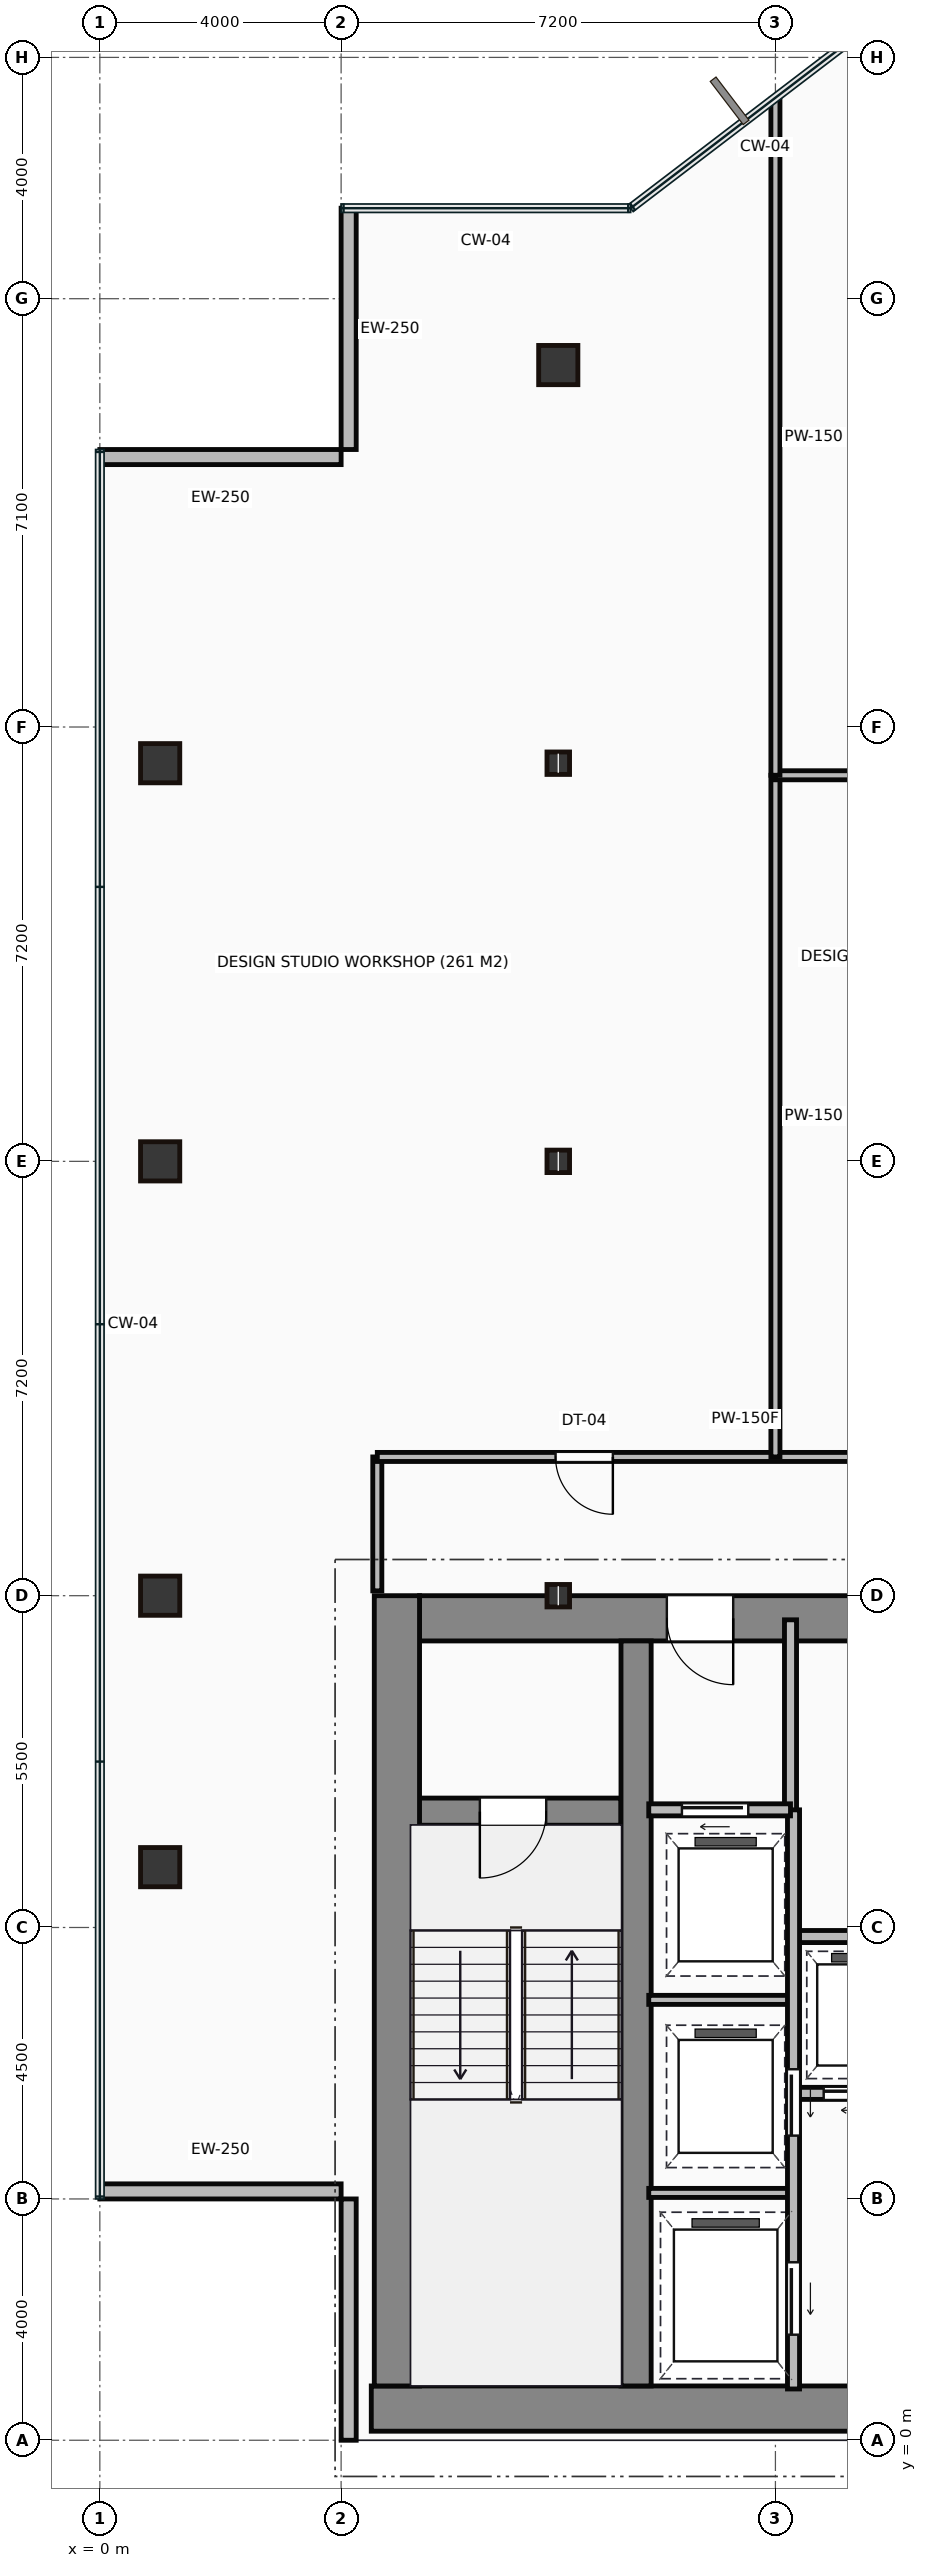
"""IFC4 building model, lengths in metres.
Left out: names, types, materials, properties, quantities, classifications, styles, units other than length and angle.
Written with IfcOpenShell. Run it as: python <this file> out.ifc"""

import sys

from ifc_helpers import new_model, si_unit, direction, frame, frame_2d, origin, origin_2d, place, context, subcontext, project, spatial, rectangle, hollow_rectangle, i_section, extrude, source, transform, mapped, element, fill, save


model = new_model("IFC4")
c1 = context("Model", 3, precision=1e-05, world=origin(), true_north=direction((0.0, 1.0)))
c2 = subcontext(c1, "Body", "Model", "MODEL_VIEW")
j1 = project(units=[si_unit("LENGTHUNIT", "METRE"), si_unit("PLANEANGLEUNIT", "RADIAN")], contexts=[c1])
p1 = place(None, origin())
s1 = spatial("IfcSite", under=j1, at=p1, CompositionType="ELEMENT")
p2 = place(p1, origin())
s2 = spatial("IfcBuilding", under=s1, at=p2, CompositionType="ELEMENT")
p3 = place(p2, frame((0.0, 0.0, 173.45)))
s3 = spatial("IfcBuildingStorey", under=s2, at=p3, CompositionType="ELEMENT", Elevation=173.45)
m1 = source(origin(), c2, "Body", "SweptSolid", [
    extrude(rectangle(XDim=29.5, YDim=0.75, at=frame_2d((14.75, 0.0))), origin(), (0.0, 0.0, 1.0), 3.65),
])
p4 = place(p3, frame((4.5, 0.525, 0.0), z_axis=(0.0, 0.0, 1.0), x_axis=(1.0, 0.0, 0.0)))
e1 = element("IfcWall", 1, at=p4, inside=s3, PredefinedType="SHEAR", context=c2, shape_type="MappedRepresentation", body=[
    mapped(m1, transform((0.0, 0.0, 0.0))),
])
m2 = source(origin(), c2, "Body", "SweptSolid", [
    extrude(rectangle(XDim=13.1, YDim=0.75, at=frame_2d((6.55, 0.0))), origin(), (0.0, 0.0, 1.0), 3.65),
])
p5 = place(p3, frame((4.925, 0.9, 0.0), z_axis=(0.0, 0.0, 1.0), x_axis=(0.0, 1.0, 0.0)))
e2 = element("IfcWall", 2, at=p5, inside=s3, PredefinedType="SHEAR", context=c2, shape_type="MappedRepresentation", body=[
    mapped(m2, transform((0.0, 0.0, 0.0))),
])
m3 = source(origin(), c2, "Body", "SweptSolid", [
    extrude(rectangle(XDim=9.1, YDim=0.75, at=frame_2d((4.55, 0.0))), origin(), (0.0, 0.0, 1.0), 3.65),
])
p6 = place(p3, frame((5.3, 13.625, 0.0), z_axis=(0.0, 0.0, 1.0), x_axis=(1.0, 0.0, 0.0)))
e3 = element("IfcWall", 3, at=p6, inside=s3, PredefinedType="SHEAR", context=c2, shape_type="MappedRepresentation", body=[
    mapped(m3, transform((0.0, 0.0, 0.0))),
])
p7 = place(p6, frame((4.1, 0.0, 0.0)))
e4 = element("IfcOpeningElement", 4, at=p7, cuts=e3, PredefinedType="OPENING", context=c2, shape_type="SweptSolid", body=[
    extrude(rectangle(XDim=1.1, YDim=2.15, at=frame_2d((0.55, 1.075))), frame((0.0, 0.385, 0.0), z_axis=(0.0, -1.0, 0.0), x_axis=(1.0, 0.0, 0.0)), (0.0, 0.0, 1.0), 0.77),
])
m4 = source(origin(), c2, "Body", "SweptSolid", [
    extrude(rectangle(XDim=12.35, YDim=0.5, at=frame_2d((6.175, 0.0))), origin(), (0.0, 0.0, 1.0), 3.65),
])
p8 = place(p3, frame((8.89, 0.9, 0.0), z_axis=(0.0, 0.0, 1.0), x_axis=(0.0, 1.0, 0.0)))
e5 = element("IfcWall", 5, at=p8, inside=s3, PredefinedType="SHEAR", context=c2, shape_type="MappedRepresentation", body=[
    mapped(m4, transform((0.0, 0.0, 0.0))),
])
m5 = source(origin(), c2, "Body", "SweptSolid", [
    extrude(rectangle(XDim=3.39, YDim=0.45, at=frame_2d((1.695, 0.0))), origin(), (0.0, 0.0, 1.0), 3.65),
])
p9 = place(p3, frame((5.25, 10.42, 0.0), z_axis=(0.0, 0.0, 1.0), x_axis=(1.0, 0.0, 0.0)))
e6 = element("IfcWall", 6, at=p9, inside=s3, PredefinedType="SHEAR", context=c2, shape_type="MappedRepresentation", body=[
    mapped(m5, transform((0.0, 0.0, 0.0))),
])
p10 = place(p9, frame((1.05, 0.0, 0.0)))
e7 = element("IfcOpeningElement", 7, at=p10, cuts=e6, PredefinedType="OPENING", context=c2, shape_type="SweptSolid", body=[
    extrude(rectangle(XDim=1.1, YDim=2.15, at=frame_2d((0.55, 1.075))), frame((0.0, 0.235, 0.0), z_axis=(0.0, -1.0, 0.0), x_axis=(1.0, 0.0, 0.0)), (0.0, 0.0, 1.0), 0.47),
])
m6 = source(origin(), c2, "Body", "SweptSolid", [
    extrude(hollow_rectangle(XDim=0.65, YDim=0.65, WallThickness=0.032, at=origin_2d()), origin(), (0.0, 0.0, 1.0), 3.65),
])
for number, where, z_axis, x_axis in (
    (8, (1.0, 9.5, 0.0), (0.0, 0.0, 1.0), (1.0, 0.0, 0.0)),
    (9, (1.0, 14.0, 0.0), (0.0, 0.0, 1.0), (1.0, 0.0, 0.0)),
    (10, (1.0, 21.2, 0.0), (0.0, 0.0, 1.0), (1.0, 0.0, 0.0)),
    (11, (1.0, 27.8, 0.0), (0.0, 0.0, 1.0), (1.0, 0.0, 0.0)),
):
    element("IfcColumn", number, at=place(p3, frame(where, z_axis=z_axis, x_axis=x_axis)), inside=s3, PredefinedType="COLUMN", context=c2, shape_type="MappedRepresentation", body=[
        mapped(m6, transform((0.0, 0.0, 0.0))),
    ])
m7 = source(origin(), c2, "Body", "SweptSolid", [
    extrude(i_section(OverallWidth=0.374, OverallDepth=0.372, WebThickness=0.016, FlangeThickness=0.026, at=origin_2d()), origin(), (0.0, 0.0, 1.0), 3.65),
])
for number, where, z_axis, x_axis in (
    (12, (7.6, 14.0, 0.0), (0.0, 0.0, 1.0), (1.0, 0.0, 0.0)),
    (13, (7.6, 21.2, 0.0), (0.0, 0.0, 1.0), (1.0, 0.0, 0.0)),
    (14, (7.6, 27.8, 0.0), (0.0, 0.0, 1.0), (1.0, 0.0, 0.0)),
):
    element("IfcColumn", number, at=place(p3, frame(where, z_axis=z_axis, x_axis=x_axis)), inside=s3, PredefinedType="COLUMN", context=c2, shape_type="MappedRepresentation", body=[
        mapped(m7, transform((0.0, 0.0, 0.0))),
    ])
p11 = place(p3, frame((7.6, 34.4, 0.0), z_axis=(0.0, 0.0, 1.0), x_axis=(1.0, 0.0, 0.0)))
e15 = element("IfcColumn", 15, at=p11, inside=s3, PredefinedType="COLUMN", context=c2, shape_type="MappedRepresentation", body=[
    mapped(m6, transform((0.0, 0.0, 0.0))),
])
m8 = source(origin(), c2, "Body", "SweptSolid", [
    extrude(rectangle(XDim=4.0, YDim=0.25, at=frame_2d((2.0, 0.0))), origin(), (0.0, 0.0, 1.0), 3.4),
])
for number, where, z_axis, x_axis in (
    (16, (4.125, 37.0, 0.0), (0.0, 0.0, 1.0), (0.0, -1.0, 0.0)),
    (17, (4.0, 32.875, 0.0), (0.0, 0.0, 1.0), (-1.0, 0.0, 0.0)),
    (18, (0.0, 4.125, 0.0), (0.0, 0.0, 1.0), (1.0, 0.0, 0.0)),
    (19, (4.125, 4.0, 0.0), (0.0, 0.0, 1.0), (0.0, -1.0, 0.0)),
):
    element("IfcWall", number, at=place(p3, frame(where, z_axis=z_axis, x_axis=x_axis)), inside=s3, PredefinedType="STANDARD", context=c2, shape_type="MappedRepresentation", body=[
        mapped(m8, transform((0.0, 0.0, 0.0))),
    ])
m9 = source(origin(), c2, "Body", "SweptSolid", [
    extrude(rectangle(XDim=3.18, YDim=0.2, at=frame_2d((1.59, 0.0))), origin(), (0.0, 0.0, 1.0), 3.4),
])
p12 = place(p3, frame((11.45, 10.42, 0.0), z_axis=(0.0, 0.0, 1.0), x_axis=(0.0, 1.0, 0.0)))
e20 = element("IfcWall", 20, at=p12, inside=s3, PredefinedType="PARTITIONING", context=c2, shape_type="MappedRepresentation", body=[
    mapped(m9, transform((0.0, 0.0, 0.0))),
])
m10 = source(origin(), c2, "Body", "SweptSolid", [
    extrude(rectangle(XDim=2.35, YDim=0.2, at=frame_2d((1.175, 0.0))), origin(), (0.0, 0.0, 1.0), 3.4),
])
p13 = place(p3, frame((9.1, 10.45, 0.0), z_axis=(0.0, 0.0, 1.0), x_axis=(1.0, 0.0, 0.0)))
e21 = element("IfcWall", 21, at=p13, inside=s3, PredefinedType="PARTITIONING", context=c2, shape_type="MappedRepresentation", body=[
    mapped(m10, transform((0.0, 0.0, 0.0))),
])
p14 = place(p13, frame((0.55, 0.0, 0.0)))
e22 = element("IfcOpeningElement", 22, at=p14, cuts=e21, PredefinedType="OPENING", context=c2, shape_type="SweptSolid", body=[
    extrude(rectangle(XDim=1.1, YDim=2.15, at=frame_2d((0.55, 1.075))), frame((0.0, 0.11, 0.0), z_axis=(0.0, -1.0, 0.0), x_axis=(1.0, 0.0, 0.0)), (0.0, 0.0, 1.0), 0.22),
])
m11 = source(origin(), c2, "Body", "SweptSolid", [
    extrude(rectangle(XDim=9.6, YDim=0.2, at=frame_2d((4.8, 0.0))), origin(), (0.0, 0.0, 1.0), 3.4),
])
p15 = place(p3, frame((11.5, 0.85, 0.0), z_axis=(0.0, 0.0, 1.0), x_axis=(0.0, 1.0, 0.0)))
e23 = element("IfcWall", 23, at=p15, inside=s3, PredefinedType="PARTITIONING", context=c2, shape_type="MappedRepresentation", body=[
    mapped(m11, transform((0.0, 0.0, 0.0))),
])
p16 = place(p15, frame((4.2, 0.0, 0.0)))
e24 = element("IfcOpeningElement", 24, at=p16, cuts=e23, PredefinedType="OPENING", context=c2, shape_type="SweptSolid", body=[
    extrude(rectangle(XDim=1.1, YDim=2.15, at=frame_2d((0.55, 1.075))), frame((0.0, 0.11, 0.0), z_axis=(0.0, -1.0, 0.0), x_axis=(1.0, 0.0, 0.0)), (0.0, 0.0, 1.0), 0.22),
])
p17 = place(p15, frame((0.9, 0.0, 0.0)))
e25 = element("IfcOpeningElement", 25, at=p17, cuts=e23, PredefinedType="OPENING", context=c2, shape_type="SweptSolid", body=[
    extrude(rectangle(XDim=1.2, YDim=2.15, at=frame_2d((0.6, 1.075))), frame((0.0, 0.11, 0.0), z_axis=(0.0, -1.0, 0.0), x_axis=(1.0, 0.0, 0.0)), (0.0, 0.0, 1.0), 0.22),
])
m12 = source(origin(), c2, "Body", "SweptSolid", [
    extrude(rectangle(XDim=2.4, YDim=0.15, at=frame_2d((1.2, 0.0))), origin(), (0.0, 0.0, 1.0), 3.4),
])
for number, where, z_axis, x_axis in (
    (26, (9.1, 4.1, 0.0), (0.0, 0.0, 1.0), (1.0, 0.0, 0.0)),
    (27, (9.1, 7.3, 0.0), (0.0, 0.0, 1.0), (1.0, 0.0, 0.0)),
):
    element("IfcWall", number, at=place(p3, frame(where, z_axis=z_axis, x_axis=x_axis)), inside=s3, PredefinedType="PARTITIONING", context=c2, shape_type="MappedRepresentation", body=[
        mapped(m12, transform((0.0, 0.0, 0.0))),
    ])
m13 = source(origin(), c2, "Body", "SweptSolid", [
    extrude(rectangle(XDim=11.85, YDim=0.2, at=frame_2d((5.925, 0.0))), origin(), (0.0, 0.0, 1.0), 3.4),
])
p18 = place(p3, frame((11.55, 5.75, 0.0), z_axis=(0.0, 0.0, 1.0), x_axis=(1.0, 0.0, 0.0)))
e28 = element("IfcWall", 28, at=p18, inside=s3, PredefinedType="PARTITIONING", context=c2, shape_type="MappedRepresentation", body=[
    mapped(m13, transform((0.0, 0.0, 0.0))),
])
p19 = place(p18, frame((0.45, 0.0, 0.0)))
e29 = element("IfcOpeningElement", 29, at=p19, cuts=e28, PredefinedType="OPENING", context=c2, shape_type="SweptSolid", body=[
    extrude(rectangle(XDim=1.05, YDim=2.15, at=frame_2d((0.525, 1.075))), frame((0.0, 0.11, 0.0), z_axis=(0.0, -1.0, 0.0), x_axis=(1.0, 0.0, 0.0)), (0.0, 0.0, 1.0), 0.22),
])
p20 = place(p18, frame((2.4, 0.0, 0.0)))
e30 = element("IfcOpeningElement", 30, at=p20, cuts=e28, PredefinedType="OPENING", context=c2, shape_type="SweptSolid", body=[
    extrude(rectangle(XDim=1.05, YDim=2.15, at=frame_2d((0.525, 1.075))), frame((0.0, 0.11, 0.0), z_axis=(0.0, -1.0, 0.0), x_axis=(1.0, 0.0, 0.0)), (0.0, 0.0, 1.0), 0.22),
])
p21 = place(p18, frame((4.35, 0.0, 0.0)))
e31 = element("IfcOpeningElement", 31, at=p21, cuts=e28, PredefinedType="OPENING", context=c2, shape_type="SweptSolid", body=[
    extrude(rectangle(XDim=1.05, YDim=2.15, at=frame_2d((0.525, 1.075))), frame((0.0, 0.11, 0.0), z_axis=(0.0, -1.0, 0.0), x_axis=(1.0, 0.0, 0.0)), (0.0, 0.0, 1.0), 0.22),
])
p22 = place(p18, frame((6.3, 0.0, 0.0)))
e32 = element("IfcOpeningElement", 32, at=p22, cuts=e28, PredefinedType="OPENING", context=c2, shape_type="SweptSolid", body=[
    extrude(rectangle(XDim=1.05, YDim=2.15, at=frame_2d((0.525, 1.075))), frame((0.0, 0.11, 0.0), z_axis=(0.0, -1.0, 0.0), x_axis=(1.0, 0.0, 0.0)), (0.0, 0.0, 1.0), 0.22),
])
p23 = place(p18, frame((8.25, 0.0, 0.0)))
e33 = element("IfcOpeningElement", 33, at=p23, cuts=e28, PredefinedType="OPENING", context=c2, shape_type="SweptSolid", body=[
    extrude(rectangle(XDim=1.05, YDim=2.15, at=frame_2d((0.525, 1.075))), frame((0.0, 0.11, 0.0), z_axis=(0.0, -1.0, 0.0), x_axis=(1.0, 0.0, 0.0)), (0.0, 0.0, 1.0), 0.22),
])
p24 = place(p18, frame((10.2, 0.0, 0.0)))
e34 = element("IfcOpeningElement", 34, at=p24, cuts=e28, PredefinedType="OPENING", context=c2, shape_type="SweptSolid", body=[
    extrude(rectangle(XDim=1.05, YDim=2.15, at=frame_2d((0.525, 1.075))), frame((0.0, 0.11, 0.0), z_axis=(0.0, -1.0, 0.0), x_axis=(1.0, 0.0, 0.0)), (0.0, 0.0, 1.0), 0.22),
])
p25 = place(p3, frame((11.55, 8.35, 0.0), z_axis=(0.0, 0.0, 1.0), x_axis=(1.0, 0.0, 0.0)))
e35 = element("IfcWall", 35, at=p25, inside=s3, PredefinedType="PARTITIONING", context=c2, shape_type="MappedRepresentation", body=[
    mapped(m13, transform((0.0, 0.0, 0.0))),
])
m14 = source(origin(), c2, "Body", "SweptSolid", [
    extrude(rectangle(XDim=2.22, YDim=0.15, at=frame_2d((1.11, 0.0))), origin(), (0.0, 0.0, 1.0), 3.4),
])
p26 = place(p3, frame((4.6, 14.08, 0.0), z_axis=(0.0, 0.0, 1.0), x_axis=(0.0, 1.0, 0.0)))
e36 = element("IfcWall", 36, at=p26, inside=s3, PredefinedType="PARTITIONING", context=c2, shape_type="MappedRepresentation", body=[
    mapped(m14, transform((0.0, 0.0, 0.0))),
])
m15 = source(origin(), c2, "Body", "SweptSolid", [
    extrude(rectangle(XDim=12.2, YDim=0.15, at=frame_2d((6.1, 0.0))), origin(), (0.0, 0.0, 1.0), 3.4),
])
p27 = place(p3, frame((4.6, 16.3, 0.0), z_axis=(0.0, 0.0, 1.0), x_axis=(1.0, 0.0, 0.0)))
e37 = element("IfcWall", 37, at=p27, inside=s3, PredefinedType="PARTITIONING", context=c2, shape_type="MappedRepresentation", body=[
    mapped(m15, transform((0.0, 0.0, 0.0))),
])
p28 = place(p27, frame((2.955, 0.0, 0.0)))
e38 = element("IfcOpeningElement", 38, at=p28, cuts=e37, PredefinedType="OPENING", context=c2, shape_type="SweptSolid", body=[
    extrude(rectangle(XDim=0.95, YDim=2.15, at=frame_2d((0.475, 1.075))), frame((0.0, 0.085, 0.0), z_axis=(0.0, -1.0, 0.0), x_axis=(1.0, 0.0, 0.0)), (0.0, 0.0, 1.0), 0.17),
])
m16 = source(origin(), c2, "Body", "SweptSolid", [
    extrude(rectangle(XDim=11.3, YDim=0.15, at=frame_2d((5.65, 0.0))), origin(), (0.0, 0.0, 1.0), 3.4),
])
p29 = place(p3, frame((11.2, 27.6, 0.0), z_axis=(0.0, 0.0, 1.0), x_axis=(0.0, -1.0, 0.0)))
e39 = element("IfcWall", 39, at=p29, inside=s3, PredefinedType="PARTITIONING", context=c2, shape_type="MappedRepresentation", body=[
    mapped(m16, transform((0.0, 0.0, 0.0))),
])
m17 = source(origin(), c2, "Body", "SweptSolid", [
    extrude(rectangle(XDim=5.6, YDim=0.15, at=frame_2d((2.8, 0.0))), origin(), (0.0, 0.0, 1.0), 3.4),
])
p30 = place(p3, frame((11.2, 27.6, 0.0), z_axis=(0.0, 0.0, 1.0), x_axis=(1.0, 0.0, 0.0)))
e40 = element("IfcWall", 40, at=p30, inside=s3, PredefinedType="PARTITIONING", context=c2, shape_type="MappedRepresentation", body=[
    mapped(m17, transform((0.0, 0.0, 0.0))),
])
m18 = source(origin(), c2, "Body", "SweptSolid", [
    extrude(rectangle(XDim=11.206, YDim=0.15, at=frame_2d((5.603, 0.0))), origin(), (0.0, 0.0, 1.0), 3.4),
])
p31 = place(p3, frame((11.2, 38.806, 0.0), z_axis=(0.0, 0.0, 1.0), x_axis=(0.0, -1.0, 0.0)))
e41 = element("IfcWall", 41, at=p31, inside=s3, PredefinedType="PARTITIONING", context=c2, shape_type="MappedRepresentation", body=[
    mapped(m18, transform((0.0, 0.0, 0.0))),
])
m19 = source(origin(), c2, "Body", "SweptSolid", [
    extrude(rectangle(XDim=1.1, YDim=2.15, at=frame_2d((0.55, 1.075))), frame((0.0, 0.025, 0.0), z_axis=(0.0, -1.0, 0.0), x_axis=(1.0, 0.0, 0.0)), (0.0, 0.0, 1.0), 0.05),
])
p32 = place(p10, frame((1.1, 0.0, 0.0), z_axis=(0.0, 0.0, 1.0), x_axis=(-1.0, 0.0, 0.0)))
e42 = element("IfcDoor", 42, at=p32, inside=s3, OperationType="SINGLE_SWING_LEFT", PredefinedType="DOOR", context=c2, shape_type="MappedRepresentation", body=[
    mapped(m19, transform((0.0, 0.0, 0.0))),
])
fill(e7, e42)
p33 = place(p7, origin())
e43 = element("IfcDoor", 43, at=p33, inside=s3, OperationType="SINGLE_SWING_RIGHT", PredefinedType="DOOR", context=c2, shape_type="MappedRepresentation", body=[
    mapped(m19, transform((0.0, 0.0, 0.0))),
])
fill(e4, e43)
p34 = place(p14, origin())
e44 = element("IfcDoor", 44, at=p34, inside=s3, OperationType="SLIDING_TO_LEFT", PredefinedType="DOOR", context=c2, shape_type="MappedRepresentation", body=[
    mapped(m19, transform((0.0, 0.0, 0.0))),
])
fill(e22, e44)
p35 = place(p16, frame((1.1, 0.0, 0.0), z_axis=(0.0, 0.0, 1.0), x_axis=(-1.0, 0.0, 0.0)))
e45 = element("IfcDoor", 45, at=p35, inside=s3, OperationType="SLIDING_TO_LEFT", PredefinedType="DOOR", context=c2, shape_type="MappedRepresentation", body=[
    mapped(m19, transform((0.0, 0.0, 0.0))),
])
fill(e24, e45)
m20 = source(origin(), c2, "Body", "SweptSolid", [
    extrude(rectangle(XDim=1.2, YDim=2.15, at=frame_2d((0.6, 1.075))), frame((0.0, 0.025, 0.0), z_axis=(0.0, -1.0, 0.0), x_axis=(1.0, 0.0, 0.0)), (0.0, 0.0, 1.0), 0.05),
])
p36 = place(p17, frame((1.2, 0.0, 0.0), z_axis=(0.0, 0.0, 1.0), x_axis=(-1.0, 0.0, 0.0)))
e46 = element("IfcDoor", 46, at=p36, inside=s3, OperationType="SLIDING_TO_LEFT", PredefinedType="DOOR", context=c2, shape_type="MappedRepresentation", body=[
    mapped(m20, transform((0.0, 0.0, 0.0))),
])
fill(e25, e46)
m21 = source(origin(), c2, "Body", "SweptSolid", [
    extrude(rectangle(XDim=1.05, YDim=2.15, at=frame_2d((0.525, 1.075))), frame((0.0, 0.025, 0.0), z_axis=(0.0, -1.0, 0.0), x_axis=(1.0, 0.0, 0.0)), (0.0, 0.0, 1.0), 0.05),
])
p37 = place(p19, frame((1.05, 0.0, 0.0), z_axis=(0.0, 0.0, 1.0), x_axis=(-1.0, 0.0, 0.0)))
e47 = element("IfcDoor", 47, at=p37, inside=s3, OperationType="SLIDING_TO_LEFT", PredefinedType="DOOR", context=c2, shape_type="MappedRepresentation", body=[
    mapped(m21, transform((0.0, 0.0, 0.0))),
])
fill(e29, e47)
m22 = source(origin(), c2, "Body", "SweptSolid", [
    extrude(rectangle(XDim=0.95, YDim=2.15, at=frame_2d((0.475, 1.075))), frame((0.0, 0.025, 0.0), z_axis=(0.0, -1.0, 0.0), x_axis=(1.0, 0.0, 0.0)), (0.0, 0.0, 1.0), 0.05),
])
p38 = place(p28, origin())
e48 = element("IfcDoor", 48, at=p38, inside=s3, OperationType="SINGLE_SWING_RIGHT", PredefinedType="DOOR", context=c2, shape_type="MappedRepresentation", body=[
    mapped(m22, transform((0.0, 0.0, 0.0))),
])
fill(e38, e48)
save(model, sys.argv[1])
